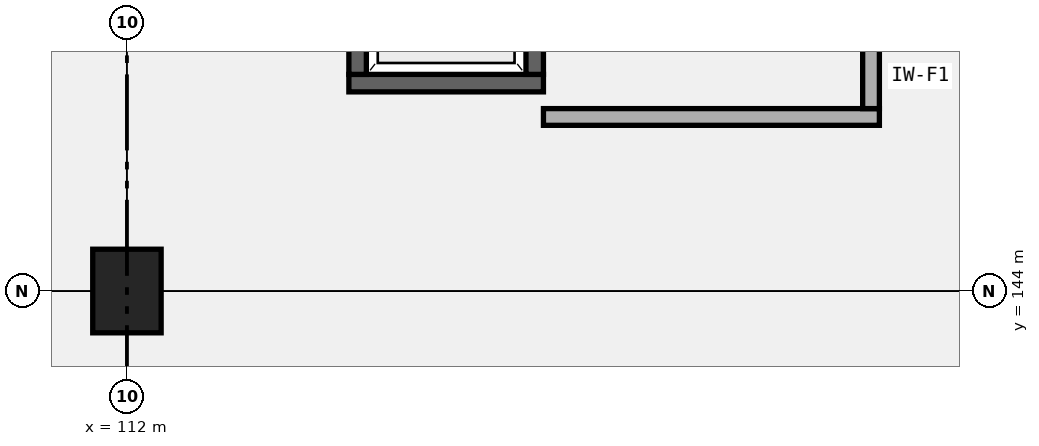
"""IFC4 building model, lengths in metres.
Left out: names, types, materials, properties, quantities, classifications, styles, units other than length and angle.
Written with IfcOpenShell. Run it as: python <this file> out.ifc"""

import sys

from ifc_helpers import new_model, si_unit, direction, frame, frame_2d, origin, origin_2d, place, context, subcontext, project, spatial, rectangle, extrude, element, save


model = new_model("IFC4")
c1 = context("Model", 3, precision=1e-05, world=origin(), true_north=direction((0.0, 1.0)))
c2 = subcontext(c1, "Body", "Model", "MODEL_VIEW")
j1 = project(units=[si_unit("LENGTHUNIT", "METRE"), si_unit("PLANEANGLEUNIT", "RADIAN")], contexts=[c1])
p1 = place(None, origin())
s1 = spatial("IfcSite", under=j1, at=p1, CompositionType="ELEMENT")
p2 = place(p1, origin())
s2 = spatial("IfcBuilding", under=s1, at=p2, CompositionType="ELEMENT")
p3 = place(p2, frame((0.0, 0.0, -4.8)))
s3 = spatial("IfcBuildingStorey", under=s2, at=p3, CompositionType="ELEMENT", Elevation=-4.8)
p4 = place(p3, frame((112.0, 144.0, 0.0), z_axis=(0.0, 0.0, 1.0), x_axis=(1.0, 0.0, 0.0)))
e1 = element("IfcColumn", 1, at=p4, inside=s3, PredefinedType="COLUMN", context=c2, shape_type="SweptSolid", body=[
    extrude(rectangle(XDim=0.9, YDim=1.1, at=origin_2d()), origin(), (0.0, 0.0, 1.0), 4.8),
])
p5 = place(p3, frame((114.92, 146.735, -0.65), z_axis=(0.0, 0.0, 1.0), x_axis=(1.0, 0.0, 0.0)))
e2 = element("IfcWall", 2, at=p5, inside=s3, PredefinedType="SHEAR", context=c2, shape_type="SweptSolid", body=[
    extrude(rectangle(XDim=2.56, YDim=0.23, at=frame_2d((1.28, 0.0))), origin(), (0.0, 0.0, 1.0), 4.5),
])
p6 = place(p3, frame((115.035, 146.85, -0.65), z_axis=(0.0, 0.0, 1.0), x_axis=(0.0, 1.0, 0.0)))
e3 = element("IfcWall", 3, at=p6, inside=s3, PredefinedType="SHEAR", context=c2, shape_type="SweptSolid", body=[
    extrude(rectangle(XDim=2.7, YDim=0.23, at=frame_2d((1.35, 0.0))), origin(), (0.0, 0.0, 1.0), 4.5),
])
p7 = place(p3, frame((117.365, 146.85, -0.65), z_axis=(0.0, 0.0, 1.0), x_axis=(0.0, 1.0, 0.0)))
e4 = element("IfcWall", 4, at=p7, inside=s3, PredefinedType="SHEAR", context=c2, shape_type="SweptSolid", body=[
    extrude(rectangle(XDim=2.7, YDim=0.23, at=frame_2d((1.35, 0.0))), origin(), (0.0, 0.0, 1.0), 4.5),
])
p8 = place(p7, frame((0.8, 0.0, 0.65)))
e5 = element("IfcOpeningElement", 5, at=p8, cuts=e4, PredefinedType="OPENING", context=c2, shape_type="SweptSolid", body=[
    extrude(rectangle(XDim=1.1, YDim=2.15, at=frame_2d((0.55, 1.075))), frame((0.0, 0.125, 0.0), z_axis=(0.0, -1.0, 0.0), x_axis=(1.0, 0.0, 0.0)), (0.0, 0.0, 1.0), 0.25),
])
p9 = place(p3, frame((117.48, 146.29, -0.65), z_axis=(0.0, 0.0, 1.0), x_axis=(1.0, 0.0, 0.0)))
e6 = element("IfcWall", 6, at=p9, inside=s3, PredefinedType="SOLIDWALL", context=c2, shape_type="SweptSolid", body=[
    extrude(rectangle(XDim=4.42, YDim=0.22, at=frame_2d((2.21, 0.0))), origin(), (0.0, 0.0, 1.0), 4.57),
])
p10 = place(p3, frame((121.79, 146.4, -0.65), z_axis=(0.0, 0.0, 1.0), x_axis=(0.0, 1.0, 0.0)))
e7 = element("IfcWall", 7, at=p10, inside=s3, PredefinedType="SOLIDWALL", context=c2, shape_type="SweptSolid", body=[
    extrude(rectangle(XDim=3.6, YDim=0.22, at=frame_2d((1.8, 0.0))), origin(), (0.0, 0.0, 1.0), 4.57),
])
p11 = place(p10, frame((1.15, 0.0, 0.65)))
e8 = element("IfcOpeningElement", 8, at=p11, cuts=e7, PredefinedType="OPENING", context=c2, shape_type="SweptSolid", body=[
    extrude(rectangle(XDim=1.3, YDim=2.15, at=frame_2d((0.65, 1.075))), frame((0.0, 0.12, 0.0), z_axis=(0.0, -1.0, 0.0), x_axis=(1.0, 0.0, 0.0)), (0.0, 0.0, 1.0), 0.24),
])
save(model, sys.argv[1])
